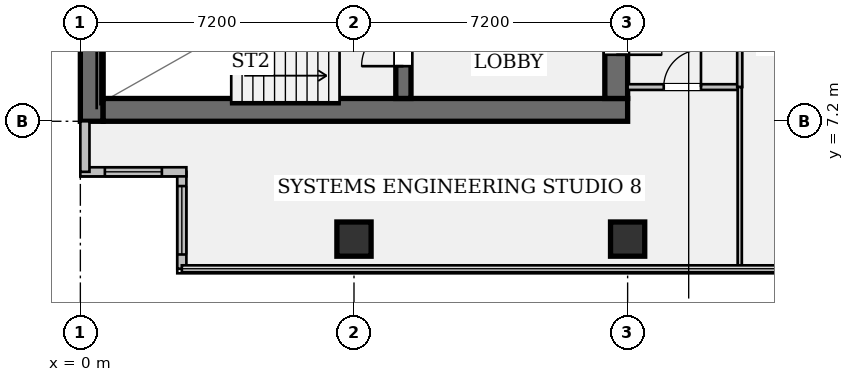
"""IFC4 building model, lengths in metres.
Left out: names, types, materials, properties, quantities, classifications, styles, units other than length and angle.
Written with IfcOpenShell. Run it as: python <this file> out.ifc"""

import sys

from ifc_helpers import new_model, si_unit, direction, frame, frame_2d, origin, origin_2d, place, context, subcontext, project, spatial, rectangle, hollow_rectangle, extrude, element, fill, save


model = new_model("IFC4")
c1 = context("Model", 3, precision=1e-05, world=origin(), true_north=direction((0.0, 1.0)))
c2 = subcontext(c1, "Body", "Model", "MODEL_VIEW")
j1 = project(units=[si_unit("LENGTHUNIT", "METRE"), si_unit("PLANEANGLEUNIT", "RADIAN")], contexts=[c1])
p1 = place(None, origin())
s1 = spatial("IfcSite", under=j1, at=p1, CompositionType="ELEMENT")
p2 = place(p1, origin())
s2 = spatial("IfcBuilding", under=s1, at=p2, CompositionType="ELEMENT")
p3 = place(p2, frame((0.0, 0.0, 129.15)))
s3 = spatial("IfcBuildingStorey", under=s2, at=p3, CompositionType="ELEMENT", Elevation=129.15)
p4 = place(p3, frame((0.3, 7.2, 0.0), z_axis=(0.0, 0.0, 1.0), x_axis=(0.0, 1.0, 0.0)))
e1 = element("IfcWall", 1, at=p4, inside=s3, PredefinedType="SHEAR", context=c2, shape_type="SweptSolid", body=[
    extrude(rectangle(XDim=28.8, YDim=0.6, at=frame_2d((14.4, 0.0))), origin(), (0.0, 0.0, 1.0), 3.58),
])
p5 = place(p3, frame((0.6, 7.5, 0.0), z_axis=(0.0, 0.0, 1.0), x_axis=(1.0, 0.0, 0.0)))
e2 = element("IfcWall", 2, at=p5, inside=s3, PredefinedType="SHEAR", context=c2, shape_type="SweptSolid", body=[
    extrude(rectangle(XDim=13.8, YDim=0.6, at=frame_2d((6.9, 0.0))), origin(), (0.0, 0.0, 1.0), 3.58),
])
p6 = place(p3, frame((14.1, 35.4, 0.0), z_axis=(0.0, 0.0, 1.0), x_axis=(0.0, -1.0, 0.0)))
e3 = element("IfcWall", 3, at=p6, inside=s3, PredefinedType="SHEAR", context=c2, shape_type="SweptSolid", body=[
    extrude(rectangle(XDim=27.6, YDim=0.6, at=frame_2d((13.8, 0.0))), origin(), (0.0, 0.0, 1.0), 3.58),
])
p7 = place(p6, frame((1.3, 0.0, 0.0)))
e4 = element("IfcOpeningElement", 4, at=p7, cuts=e3, PredefinedType="OPENING", context=c2, shape_type="SweptSolid", body=[
    extrude(rectangle(XDim=1.2, YDim=2.15, at=frame_2d((0.6, 1.075))), frame((0.0, 0.312, 0.0), z_axis=(0.0, -1.0, 0.0), x_axis=(1.0, 0.0, 0.0)), (0.0, 0.0, 1.0), 0.624),
])
p8 = place(p6, frame((25.25, 0.0, 0.0)))
e5 = element("IfcOpeningElement", 5, at=p8, cuts=e3, PredefinedType="OPENING", context=c2, shape_type="SweptSolid", body=[
    extrude(rectangle(XDim=1.2, YDim=2.15, at=frame_2d((0.6, 1.075))), frame((0.0, 0.312, 0.0), z_axis=(0.0, -1.0, 0.0), x_axis=(1.0, 0.0, 0.0)), (0.0, 0.0, 1.0), 0.624),
])
p9 = place(p6, frame((14.6, 0.0, 0.0)))
e6 = element("IfcOpeningElement", 6, at=p9, cuts=e3, PredefinedType="OPENING", context=c2, shape_type="SweptSolid", body=[
    extrude(rectangle(XDim=1.6, YDim=2.2, at=frame_2d((0.8, 1.1))), frame((0.0, 0.312, 0.0), z_axis=(0.0, -1.0, 0.0), x_axis=(1.0, 0.0, 0.0)), (0.0, 0.0, 1.0), 0.624),
])
p10 = place(p3, frame((8.5, 7.8, 0.0), z_axis=(0.0, 0.0, 1.0), x_axis=(0.0, 1.0, 0.0)))
e7 = element("IfcWall", 7, at=p10, inside=s3, PredefinedType="SHEAR", context=c2, shape_type="SweptSolid", body=[
    extrude(rectangle(XDim=3.68, YDim=0.4, at=frame_2d((1.84, 0.0))), origin(), (0.0, 0.0, 1.0), 3.58),
])
p11 = place(p10, frame((0.85, 0.0, 0.0)))
e8 = element("IfcOpeningElement", 8, at=p11, cuts=e7, PredefinedType="OPENING", context=c2, shape_type="SweptSolid", body=[
    extrude(rectangle(XDim=1.1, YDim=2.15, at=frame_2d((0.55, 1.075))), frame((0.0, 0.212, 0.0), z_axis=(0.0, -1.0, 0.0), x_axis=(1.0, 0.0, 0.0)), (0.0, 0.0, 1.0), 0.424),
])
for number, where, z_axis, x_axis in (
    (9, (7.2, 4.1, 0.0), (0.0, 0.0, 1.0), (1.0, 0.0, 0.0)),
    (10, (14.4, 4.1, 0.0), (0.0, 0.0, 1.0), (1.0, 0.0, 0.0)),
):
    element("IfcColumn", number, at=place(p3, frame(where, z_axis=z_axis, x_axis=x_axis)), inside=s3, PredefinedType="COLUMN", context=c2, shape_type="SweptSolid", body=[
        extrude(hollow_rectangle(XDim=0.9, YDim=0.9, WallThickness=0.055, at=origin_2d()), origin(), (0.0, 0.0, 1.0), 3.58),
    ])
p12 = place(p3, frame((2.67, 3.32, 0.0), z_axis=(0.0, 0.0, 1.0), x_axis=(0.0, 1.0, 0.0)))
e11 = element("IfcWall", 11, at=p12, inside=s3, PredefinedType="STANDARD", context=c2, shape_type="SweptSolid", body=[
    extrude(rectangle(XDim=2.55, YDim=0.24, at=frame_2d((1.275, 0.0))), origin(), (0.0, 0.0, 1.0), 3.58),
])
p13 = place(p12, frame((0.375, 0.0, 0.95)))
e12 = element("IfcOpeningElement", 12, at=p13, cuts=e11, PredefinedType="OPENING", context=c2, shape_type="SweptSolid", body=[
    extrude(rectangle(XDim=1.8, YDim=1.35, at=frame_2d((0.9, 0.675))), frame((0.0, 0.132, 0.0), z_axis=(0.0, -1.0, 0.0), x_axis=(1.0, 0.0, 0.0)), (0.0, 0.0, 1.0), 0.264),
])
p14 = place(p3, frame((2.79, 5.87, 0.0), z_axis=(0.0, 0.0, 1.0), x_axis=(-1.0, 0.0, 0.0)))
e13 = element("IfcWall", 13, at=p14, inside=s3, PredefinedType="STANDARD", context=c2, shape_type="SweptSolid", body=[
    extrude(rectangle(XDim=2.79, YDim=0.24, at=frame_2d((1.395, 0.0))), origin(), (0.0, 0.0, 1.0), 3.58),
])
p15 = place(p14, frame((0.645, 0.0, 0.95)))
e14 = element("IfcOpeningElement", 14, at=p15, cuts=e13, PredefinedType="OPENING", context=c2, shape_type="SweptSolid", body=[
    extrude(rectangle(XDim=1.5, YDim=1.8, at=frame_2d((0.75, 0.9))), frame((0.0, 0.132, 0.0), z_axis=(0.0, -1.0, 0.0), x_axis=(1.0, 0.0, 0.0)), (0.0, 0.0, 1.0), 0.264),
])
p16 = place(p3, frame((0.12, 5.87, 0.0), z_axis=(0.0, 0.0, 1.0), x_axis=(0.0, 1.0, 0.0)))
e15 = element("IfcWall", 15, at=p16, inside=s3, PredefinedType="STANDARD", context=c2, shape_type="SweptSolid", body=[
    extrude(rectangle(XDim=1.33, YDim=0.24, at=frame_2d((0.665, 0.0))), origin(), (0.0, 0.0, 1.0), 3.58),
])
p17 = place(p3, frame((14.4, 8.1, 0.0), z_axis=(0.0, 0.0, 1.0), x_axis=(1.0, 0.0, 0.0)))
e16 = element("IfcWall", 16, at=p17, inside=s3, PredefinedType="PARTITIONING", context=c2, shape_type="SweptSolid", body=[
    extrude(rectangle(XDim=2.95, YDim=0.15, at=frame_2d((1.475, 0.0))), origin(), (0.0, 0.0, 1.0), 3.148),
])
p18 = place(p17, frame((0.95, 0.0, 0.0)))
e17 = element("IfcOpeningElement", 17, at=p18, cuts=e16, PredefinedType="OPENING", context=c2, shape_type="SweptSolid", body=[
    extrude(rectangle(XDim=0.98, YDim=2.15, at=frame_2d((0.49, 1.075))), frame((0.0, 0.087, 0.0), z_axis=(0.0, -1.0, 0.0), x_axis=(1.0, 0.0, 0.0)), (0.0, 0.0, 1.0), 0.174),
])
p19 = place(p3, frame((17.35, 8.1, 0.0), z_axis=(0.0, 0.0, 1.0), x_axis=(0.0, 1.0, 0.0)))
e18 = element("IfcWall", 18, at=p19, inside=s3, PredefinedType="PARTITIONING", context=c2, shape_type="SweptSolid", body=[
    extrude(rectangle(XDim=3.0, YDim=0.135, at=frame_2d((1.5, 0.0))), origin(), (0.0, 0.0, 1.0), 3.58),
])
p20 = place(p3, frame((17.35, 3.32, 0.0), z_axis=(0.0, 0.0, 1.0), x_axis=(0.0, 1.0, 0.0)))
e19 = element("IfcWall", 19, at=p20, inside=s3, PredefinedType="PARTITIONING", context=c2, shape_type="SweptSolid", body=[
    extrude(rectangle(XDim=4.78, YDim=0.11, at=frame_2d((2.39, 0.0))), origin(), (0.0, 0.0, 1.0), 2.869),
])
p21 = place(p13, origin())
e20 = element("IfcWindow", 20, at=p21, inside=s3, PartitioningType="SINGLE_PANEL", PredefinedType="WINDOW", context=c2, shape_type="SweptSolid", body=[
    extrude(rectangle(XDim=1.8, YDim=1.35, at=frame_2d((0.9, 0.675))), frame((0.0, 0.03, 0.0), z_axis=(0.0, -1.0, 0.0), x_axis=(1.0, 0.0, 0.0)), (0.0, 0.0, 1.0), 0.06),
])
fill(e12, e20)
p22 = place(p15, origin())
e21 = element("IfcWindow", 21, at=p22, inside=s3, PartitioningType="SINGLE_PANEL", PredefinedType="WINDOW", context=c2, shape_type="SweptSolid", body=[
    extrude(rectangle(XDim=1.5, YDim=1.8, at=frame_2d((0.75, 0.9))), frame((0.0, 0.03, 0.0), z_axis=(0.0, -1.0, 0.0), x_axis=(1.0, 0.0, 0.0)), (0.0, 0.0, 1.0), 0.06),
])
fill(e14, e21)
p23 = place(p11, origin())
e22 = element("IfcDoor", 22, at=p23, inside=s3, OperationType="SINGLE_SWING_LEFT", PredefinedType="DOOR", context=c2, shape_type="SweptSolid", body=[
    extrude(rectangle(XDim=1.1, YDim=2.15, at=frame_2d((0.55, 1.075))), frame((0.0, 0.025, 0.0), z_axis=(0.0, -1.0, 0.0), x_axis=(1.0, 0.0, 0.0)), (0.0, 0.0, 1.0), 0.05),
])
fill(e8, e22)
p24 = place(p8, origin())
e23 = element("IfcDoor", 23, at=p24, inside=s3, OperationType="SINGLE_SWING_RIGHT", PredefinedType="DOOR", context=c2, shape_type="SweptSolid", body=[
    extrude(rectangle(XDim=1.2, YDim=2.15, at=frame_2d((0.6, 1.075))), frame((0.0, 0.025, 0.0), z_axis=(0.0, -1.0, 0.0), x_axis=(1.0, 0.0, 0.0)), (0.0, 0.0, 1.0), 0.05),
])
fill(e5, e23)
p25 = place(p18, origin())
e24 = element("IfcDoor", 24, at=p25, inside=s3, OperationType="SINGLE_SWING_RIGHT", PredefinedType="DOOR", context=c2, shape_type="SweptSolid", body=[
    extrude(rectangle(XDim=0.98, YDim=2.15, at=frame_2d((0.49, 1.075))), frame((0.0, 0.025, 0.0), z_axis=(0.0, -1.0, 0.0), x_axis=(1.0, 0.0, 0.0)), (0.0, 0.0, 1.0), 0.05),
])
fill(e17, e24)
save(model, sys.argv[1])
